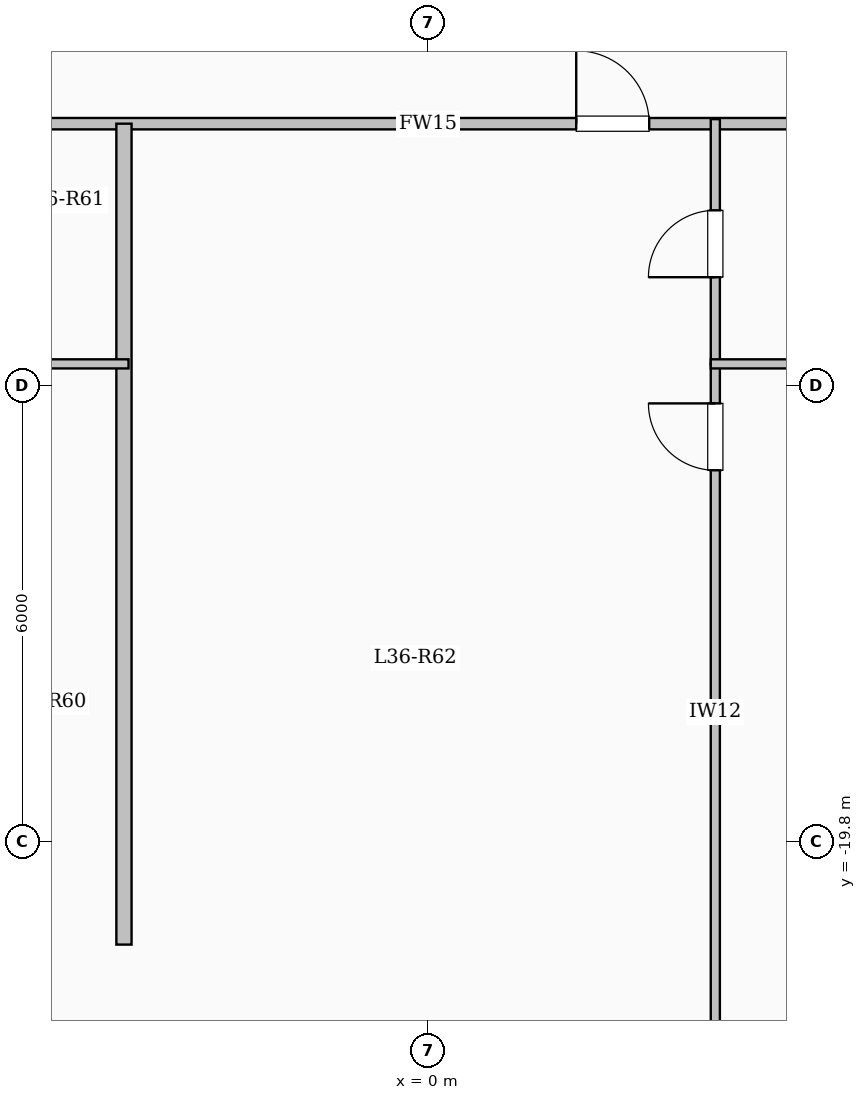
"""IFC4 building model, lengths in metres.
Left out: names, types, materials, properties, quantities, classifications, styles, units other than length and angle.
Written with IfcOpenShell. Run it as: python <this file> out.ifc"""

import sys

from ifc_helpers import new_model, si_unit, direction, frame, frame_2d, origin, place, context, subcontext, project, spatial, rectangle, extrude, element, fill, save


model = new_model("IFC4")
c1 = context("Model", 3, precision=1e-05, world=origin(), true_north=direction((0.0, 1.0)))
c2 = subcontext(c1, "Body", "Model", "MODEL_VIEW")
j1 = project(units=[si_unit("LENGTHUNIT", "METRE"), si_unit("PLANEANGLEUNIT", "RADIAN")], contexts=[c1])
p1 = place(None, origin())
s1 = spatial("IfcSite", under=j1, at=p1, CompositionType="ELEMENT")
p2 = place(p1, origin())
s2 = spatial("IfcBuilding", under=s1, at=p2, CompositionType="ELEMENT")
p3 = place(p2, frame((0.0, 0.0, 135.95)))
s3 = spatial("IfcBuildingStorey", under=s2, at=p3, CompositionType="ELEMENT", Elevation=135.95)
p4 = place(p3, frame((7.35, -21.15, 0.0), z_axis=(0.0, 0.0, 1.0), x_axis=(-0.894427191, -0.4472135955, 0.0)))
e1 = element("IfcWall", 1, at=p4, inside=s3, PredefinedType="SOLIDWALL", context=c2, shape_type="SweptSolid", body=[
    extrude(rectangle(XDim=3.354, YDim=0.28, at=frame_2d((1.677, 0.0))), origin(), (0.0, 0.0, 1.0), 3.1),
])
p5 = place(p4, frame((0.501, 0.0, 0.95)))
e2 = element("IfcOpeningElement", 2, at=p5, cuts=e1, PredefinedType="OPENING", context=c2, shape_type="SweptSolid", body=[
    extrude(rectangle(XDim=1.2, YDim=1.5, at=frame_2d((0.6, 0.75))), frame((0.0, 0.15, 0.0), z_axis=(0.0, -1.0, 0.0), x_axis=(1.0, 0.0, 0.0)), (0.0, 0.0, 1.0), 0.3),
])
p6 = place(p3, frame((-4.35, -22.65, 0.0), z_axis=(0.0, 0.0, 1.0), x_axis=(-0.894427191, 0.4472135955, 0.0)))
e3 = element("IfcWall", 3, at=p6, inside=s3, PredefinedType="SOLIDWALL", context=c2, shape_type="SweptSolid", body=[
    extrude(rectangle(XDim=3.354, YDim=0.28, at=frame_2d((1.677, 0.0))), origin(), (0.0, 0.0, 1.0), 3.1),
])
p7 = place(p6, frame((2.124, 0.0, 0.95)))
e4 = element("IfcOpeningElement", 4, at=p7, cuts=e3, PredefinedType="OPENING", context=c2, shape_type="SweptSolid", body=[
    extrude(rectangle(XDim=0.85, YDim=1.5, at=frame_2d((0.425, 0.75))), frame((0.0, 0.15, 0.0), z_axis=(0.0, -1.0, 0.0), x_axis=(1.0, 0.0, 0.0)), (0.0, 0.0, 1.0), 0.3),
])
p8 = place(p3, frame((-8.55, -10.35, 0.0), z_axis=(0.0, 0.0, 1.0), x_axis=(1.0, 0.0, 0.0)))
e5 = element("IfcWall", 5, at=p8, inside=s3, PredefinedType="PARTITIONING", context=c2, shape_type="SweptSolid", body=[
    extrude(rectangle(XDim=17.1, YDim=0.15, at=frame_2d((8.55, 0.0))), origin(), (0.0, 0.0, 1.0), 3.1),
])
p9 = place(p8, frame((1.15, 0.0, 0.0)))
e6 = element("IfcOpeningElement", 6, at=p9, cuts=e5, PredefinedType="OPENING", context=c2, shape_type="SweptSolid", body=[
    extrude(rectangle(XDim=0.96, YDim=2.15, at=frame_2d((0.48, 1.075))), frame((0.0, 0.085, 0.0), z_axis=(0.0, -1.0, 0.0), x_axis=(1.0, 0.0, 0.0)), (0.0, 0.0, 1.0), 0.17),
])
p10 = place(p8, frame((10.5, 0.0, 0.0)))
e7 = element("IfcOpeningElement", 7, at=p10, cuts=e5, PredefinedType="OPENING", context=c2, shape_type="SweptSolid", body=[
    extrude(rectangle(XDim=0.96, YDim=2.15, at=frame_2d((0.48, 1.075))), frame((0.0, 0.085, 0.0), z_axis=(0.0, -1.0, 0.0), x_axis=(1.0, 0.0, 0.0)), (0.0, 0.0, 1.0), 0.17),
])
p11 = place(p3, frame((-4.0, -21.15, 0.0), z_axis=(0.0, 0.0, 1.0), x_axis=(0.0, 1.0, 0.0)))
e8 = element("IfcWall", 8, at=p11, inside=s3, PredefinedType="SOLIDWALL", context=c2, shape_type="SweptSolid", body=[
    extrude(rectangle(XDim=10.8, YDim=0.2, at=frame_2d((5.4, 0.0))), origin(), (0.0, 0.0, 1.0), 3.1),
])
p12 = place(p3, frame((-6.14, -13.51, 0.0), z_axis=(0.0, 0.0, 1.0), x_axis=(1.0, 0.0, 0.0)))
e9 = element("IfcWall", 9, at=p12, inside=s3, PredefinedType="PARTITIONING", context=c2, shape_type="SweptSolid", body=[
    extrude(rectangle(XDim=2.2, YDim=0.12, at=frame_2d((1.1, 0.0))), origin(), (0.0, 0.0, 1.0), 3.1),
])
p13 = place(p3, frame((3.78, -22.68, 0.0), z_axis=(0.0, 0.0, 1.0), x_axis=(0.0, 1.0, 0.0)))
e10 = element("IfcWall", 10, at=p13, inside=s3, PredefinedType="PARTITIONING", context=c2, shape_type="SweptSolid", body=[
    extrude(rectangle(XDim=9.17, YDim=0.12, at=frame_2d((4.585, 0.0))), origin(), (0.0, 0.0, 1.0), 3.1),
])
p14 = place(p13, frame((7.77, 0.0, 0.0)))
e11 = element("IfcOpeningElement", 11, at=p14, cuts=e10, PredefinedType="OPENING", context=c2, shape_type="SweptSolid", body=[
    extrude(rectangle(XDim=0.88, YDim=2.1, at=frame_2d((0.44, 1.05))), frame((0.0, 0.07, 0.0), z_axis=(0.0, -1.0, 0.0), x_axis=(1.0, 0.0, 0.0)), (0.0, 0.0, 1.0), 0.14),
])
p15 = place(p3, frame((3.78, -13.51, 0.0), z_axis=(0.0, 0.0, 1.0), x_axis=(0.0, 1.0, 0.0)))
e12 = element("IfcWall", 12, at=p15, inside=s3, PredefinedType="PARTITIONING", context=c2, shape_type="SweptSolid", body=[
    extrude(rectangle(XDim=3.22, YDim=0.12, at=frame_2d((1.61, 0.0))), origin(), (0.0, 0.0, 1.0), 3.1),
])
p16 = place(p15, frame((1.14, 0.0, 0.0)))
e13 = element("IfcOpeningElement", 13, at=p16, cuts=e12, PredefinedType="OPENING", context=c2, shape_type="SweptSolid", body=[
    extrude(rectangle(XDim=0.88, YDim=2.1, at=frame_2d((0.44, 1.05))), frame((0.0, 0.07, 0.0), z_axis=(0.0, -1.0, 0.0), x_axis=(1.0, 0.0, 0.0)), (0.0, 0.0, 1.0), 0.14),
])
p17 = place(p3, frame((3.72, -13.51, 0.0), z_axis=(0.0, 0.0, 1.0), x_axis=(1.0, 0.0, 0.0)))
e14 = element("IfcWall", 14, at=p17, inside=s3, PredefinedType="PARTITIONING", context=c2, shape_type="SweptSolid", body=[
    extrude(rectangle(XDim=4.89, YDim=0.12, at=frame_2d((2.445, 0.0))), origin(), (0.0, 0.0, 1.0), 3.1),
])
p18 = place(p10, origin())
e15 = element("IfcDoor", 15, at=p18, inside=s3, OperationType="SINGLE_SWING_LEFT", PredefinedType="DOOR", context=c2, shape_type="SweptSolid", body=[
    extrude(rectangle(XDim=0.96, YDim=2.15, at=frame_2d((0.48, 1.075))), frame((0.0, 0.025, 0.0), z_axis=(0.0, -1.0, 0.0), x_axis=(1.0, 0.0, 0.0)), (0.0, 0.0, 1.0), 0.05),
])
fill(e7, e15)
p19 = place(p14, origin())
e16 = element("IfcDoor", 16, at=p19, inside=s3, OperationType="SINGLE_SWING_RIGHT", PredefinedType="DOOR", context=c2, shape_type="SweptSolid", body=[
    extrude(rectangle(XDim=0.88, YDim=2.1, at=frame_2d((0.44, 1.05))), frame((0.0, 0.025, 0.0), z_axis=(0.0, -1.0, 0.0), x_axis=(1.0, 0.0, 0.0)), (0.0, 0.0, 1.0), 0.05),
])
fill(e11, e16)
p20 = place(p16, origin())
e17 = element("IfcDoor", 17, at=p20, inside=s3, OperationType="SINGLE_SWING_LEFT", PredefinedType="DOOR", context=c2, shape_type="SweptSolid", body=[
    extrude(rectangle(XDim=0.88, YDim=2.1, at=frame_2d((0.44, 1.05))), frame((0.0, 0.025, 0.0), z_axis=(0.0, -1.0, 0.0), x_axis=(1.0, 0.0, 0.0)), (0.0, 0.0, 1.0), 0.05),
])
fill(e13, e17)
save(model, sys.argv[1])
